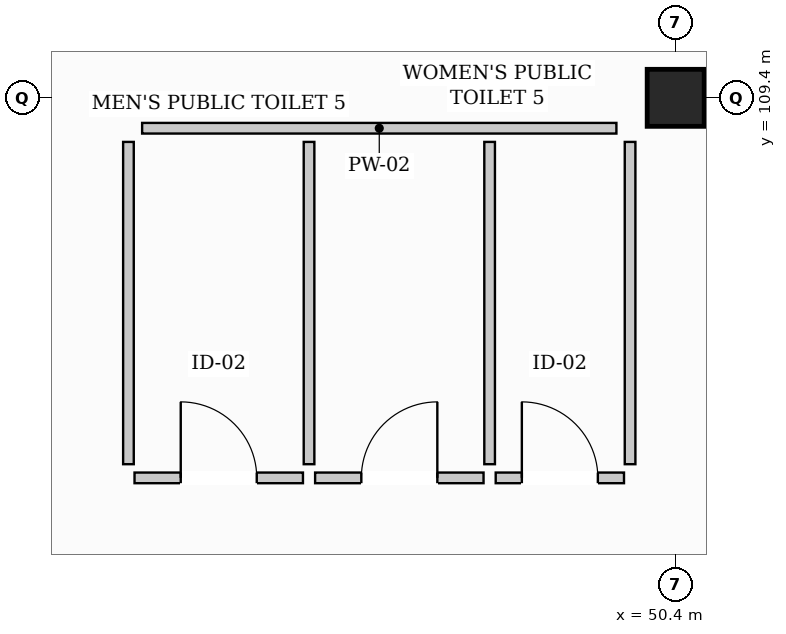
"""IFC4 building model, lengths in metres.
Left out: names, types, materials, properties, quantities, classifications, styles, units other than length and angle.
Written with IfcOpenShell. Run it as: python <this file> out.ifc"""

import sys

from ifc_helpers import new_model, si_unit, direction, frame, frame_2d, origin, origin_2d, place, context, subcontext, project, spatial, rectangle, extrude, element, fill, save


model = new_model("IFC4")
c1 = context("Model", 3, precision=1e-05, world=origin(), true_north=direction((0.0, 1.0)))
c2 = subcontext(c1, "Body", "Model", "MODEL_VIEW")
j1 = project(units=[si_unit("LENGTHUNIT", "METRE"), si_unit("PLANEANGLEUNIT", "RADIAN")], contexts=[c1])
p1 = place(None, origin())
s1 = spatial("IfcSite", under=j1, at=p1, CompositionType="ELEMENT")
p2 = place(p1, origin())
s2 = spatial("IfcBuilding", under=s1, at=p2, CompositionType="ELEMENT")
p3 = place(p2, frame((0.0, 0.0, -4.2)))
s3 = spatial("IfcBuildingStorey", under=s2, at=p3, CompositionType="ELEMENT", Elevation=-4.2)
p4 = place(p3, frame((50.4, 109.4, 0.0), z_axis=(0.0, 0.0, 1.0), x_axis=(1.0, 0.0, 0.0)))
e1 = element("IfcColumn", 1, at=p4, inside=s3, PredefinedType="COLUMN", context=c2, shape_type="SweptSolid", body=[
    extrude(rectangle(XDim=0.75, YDim=0.75, at=origin_2d()), origin(), (0.0, 0.0, 1.0), 4.2),
])
p5 = place(p3, frame((43.38, 109.0, 0.0), z_axis=(0.0, 0.0, 1.0), x_axis=(1.0, 0.0, 0.0)))
e2 = element("IfcWall", 2, at=p5, inside=s3, PredefinedType="PARTITIONING", context=c2, shape_type="SweptSolid", body=[
    extrude(rectangle(XDim=6.24, YDim=0.14, at=frame_2d((3.12, 0.0))), origin(), (0.0, 0.0, 1.0), 3.51),
])
for number, where, z_axis, x_axis in (
    (3, (43.2, 104.58, 0.0), (0.0, 0.0, 1.0), (0.0, 1.0, 0.0)),
    (4, (49.8, 104.58, 0.0), (0.0, 0.0, 1.0), (0.0, 1.0, 0.0)),
    (5, (45.576, 104.58, 0.0), (0.0, 0.0, 1.0), (0.0, 1.0, 0.0)),
    (6, (47.952, 104.58, 0.0), (0.0, 0.0, 1.0), (0.0, 1.0, 0.0)),
):
    element("IfcWall", number, at=place(p3, frame(where, z_axis=z_axis, x_axis=x_axis)), inside=s3, PredefinedType="PARTITIONING", context=c2, shape_type="SweptSolid", body=[
        extrude(rectangle(XDim=4.24, YDim=0.14, at=frame_2d((2.12, 0.0))), origin(), (0.0, 0.0, 1.0), 3.84),
    ])
p6 = place(p3, frame((43.28, 104.4, 0.0), z_axis=(0.0, 0.0, 1.0), x_axis=(1.0, 0.0, 0.0)))
e7 = element("IfcWall", 7, at=p6, inside=s3, PredefinedType="PARTITIONING", context=c2, shape_type="SweptSolid", body=[
    extrude(rectangle(XDim=2.216, YDim=0.14, at=frame_2d((1.108, 0.0))), origin(), (0.0, 0.0, 1.0), 3.84),
])
p7 = place(p6, frame((0.608, 0.0, 0.0)))
e8 = element("IfcOpeningElement", 8, at=p7, cuts=e7, PredefinedType="OPENING", context=c2, shape_type="SweptSolid", body=[
    extrude(rectangle(XDim=1.0, YDim=2.15, at=frame_2d((0.5, 1.075))), frame((0.0, 0.08, 0.0), z_axis=(0.0, -1.0, 0.0), x_axis=(1.0, 0.0, 0.0)), (0.0, 0.0, 1.0), 0.16),
])
p8 = place(p3, frame((45.656, 104.4, 0.0), z_axis=(0.0, 0.0, 1.0), x_axis=(1.0, 0.0, 0.0)))
e9 = element("IfcWall", 9, at=p8, inside=s3, PredefinedType="PARTITIONING", context=c2, shape_type="SweptSolid", body=[
    extrude(rectangle(XDim=2.216, YDim=0.14, at=frame_2d((1.108, 0.0))), origin(), (0.0, 0.0, 1.0), 3.51),
])
p9 = place(p8, frame((0.608, 0.0, 0.0)))
e10 = element("IfcOpeningElement", 10, at=p9, cuts=e9, PredefinedType="OPENING", context=c2, shape_type="SweptSolid", body=[
    extrude(rectangle(XDim=1.0, YDim=2.15, at=frame_2d((0.5, 1.075))), frame((0.0, 0.08, 0.0), z_axis=(0.0, -1.0, 0.0), x_axis=(1.0, 0.0, 0.0)), (0.0, 0.0, 1.0), 0.16),
])
p10 = place(p3, frame((48.032, 104.4, 0.0), z_axis=(0.0, 0.0, 1.0), x_axis=(1.0, 0.0, 0.0)))
e11 = element("IfcWall", 11, at=p10, inside=s3, PredefinedType="PARTITIONING", context=c2, shape_type="SweptSolid", body=[
    extrude(rectangle(XDim=1.688, YDim=0.14, at=frame_2d((0.844, 0.0))), origin(), (0.0, 0.0, 1.0), 3.84),
])
p11 = place(p10, frame((0.344, 0.0, 0.0)))
e12 = element("IfcOpeningElement", 12, at=p11, cuts=e11, PredefinedType="OPENING", context=c2, shape_type="SweptSolid", body=[
    extrude(rectangle(XDim=1.0, YDim=2.15, at=frame_2d((0.5, 1.075))), frame((0.0, 0.08, 0.0), z_axis=(0.0, -1.0, 0.0), x_axis=(1.0, 0.0, 0.0)), (0.0, 0.0, 1.0), 0.16),
])
p12 = place(p7, origin())
e13 = element("IfcDoor", 13, at=p12, inside=s3, OperationType="SINGLE_SWING_LEFT", PredefinedType="DOOR", context=c2, shape_type="SweptSolid", body=[
    extrude(rectangle(XDim=1.0, YDim=2.15, at=frame_2d((0.5, 1.075))), frame((0.0, 0.025, 0.0), z_axis=(0.0, -1.0, 0.0), x_axis=(1.0, 0.0, 0.0)), (0.0, 0.0, 1.0), 0.05),
])
fill(e8, e13)
p13 = place(p9, origin())
e14 = element("IfcDoor", 14, at=p13, inside=s3, OperationType="SINGLE_SWING_RIGHT", PredefinedType="DOOR", context=c2, shape_type="SweptSolid", body=[
    extrude(rectangle(XDim=1.0, YDim=2.15, at=frame_2d((0.5, 1.075))), frame((0.0, 0.025, 0.0), z_axis=(0.0, -1.0, 0.0), x_axis=(1.0, 0.0, 0.0)), (0.0, 0.0, 1.0), 0.05),
])
fill(e10, e14)
p14 = place(p11, origin())
e15 = element("IfcDoor", 15, at=p14, inside=s3, OperationType="SINGLE_SWING_LEFT", PredefinedType="DOOR", context=c2, shape_type="SweptSolid", body=[
    extrude(rectangle(XDim=1.0, YDim=2.15, at=frame_2d((0.5, 1.075))), frame((0.0, 0.025, 0.0), z_axis=(0.0, -1.0, 0.0), x_axis=(1.0, 0.0, 0.0)), (0.0, 0.0, 1.0), 0.05),
])
fill(e12, e15)
save(model, sys.argv[1])
